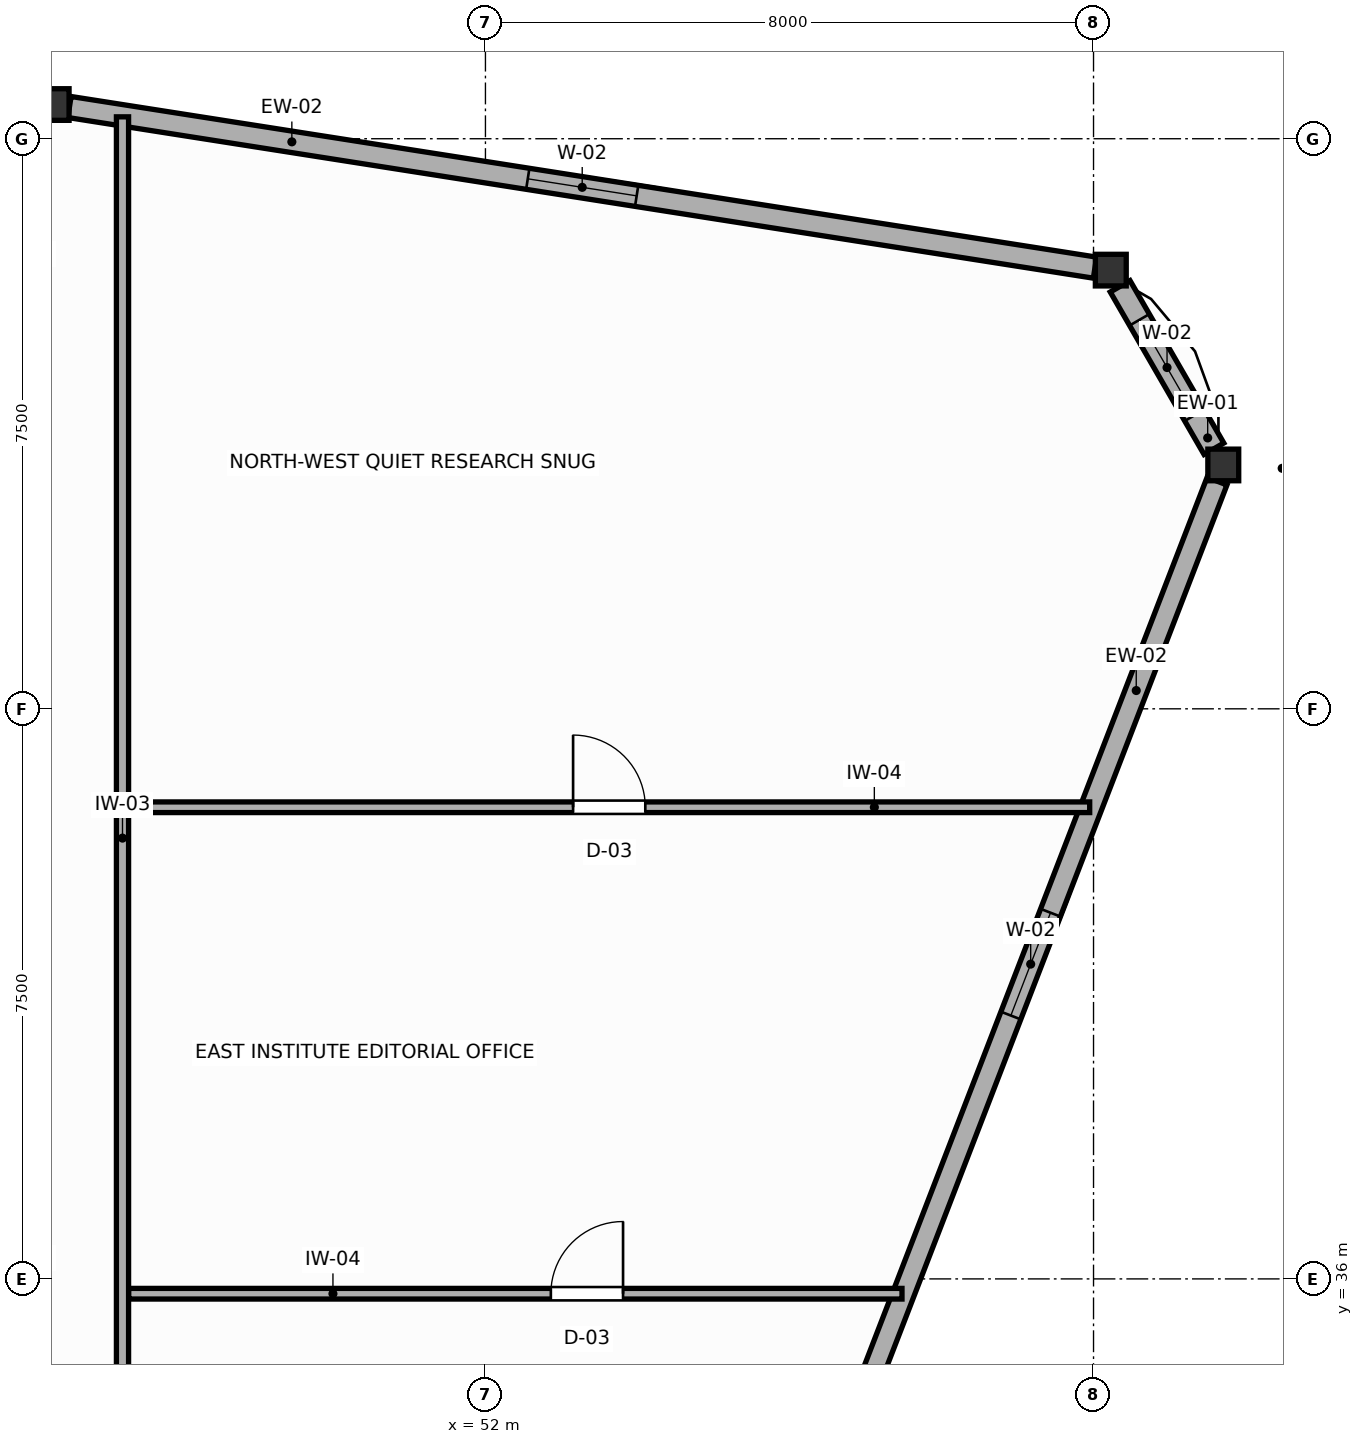
"""IFC4 building model, lengths in metres.
Left out: names, types, materials, properties, quantities, classifications, styles, units other than length and angle.
Written with IfcOpenShell. Run it as: python <this file> out.ifc"""

import sys

from ifc_helpers import new_model, si_unit, direction, frame, frame_2d, origin, origin_2d, place, context, subcontext, project, spatial, rectangle, i_section, extrude, source, transform, mapped, element, fill, save


model = new_model("IFC4")
c1 = context("Model", 3, precision=1e-05, world=origin(), true_north=direction((0.0, 1.0)))
c2 = subcontext(c1, "Body", "Model", "MODEL_VIEW")
j1 = project(units=[si_unit("LENGTHUNIT", "METRE"), si_unit("PLANEANGLEUNIT", "RADIAN")], contexts=[c1])
p1 = place(None, origin())
s1 = spatial("IfcSite", under=j1, at=p1, CompositionType="ELEMENT")
p2 = place(p1, origin())
s2 = spatial("IfcBuilding", under=s1, at=p2, CompositionType="ELEMENT")
p3 = place(p2, frame((0.0, 0.0, 220.2)))
s3 = spatial("IfcBuildingStorey", under=s2, at=p3, CompositionType="ELEMENT", Elevation=220.2)
m1 = source(origin(), c2, "Body", "SweptSolid", [
    extrude(i_section(OverallWidth=0.406, OverallDepth=0.416, WebThickness=0.027, FlangeThickness=0.044, FilletRadius=0.015, at=origin_2d()), origin(), (0.0, 0.0, 1.0), 3.6),
])
for number, where, z_axis, x_axis in (
    (1, (61.707, 46.708, 0.0), (0.0, 0.0, 1.0), (1.0, 0.0, 0.0)),
    (2, (60.227, 49.271, 0.0), (0.0, 0.0, 1.0), (1.0, 0.0, 0.0)),
    (3, (46.319, 51.45, 0.0), (0.0, 0.0, 1.0), (1.0, 0.0, 0.0)),
):
    element("IfcColumn", number, at=place(p3, frame(where, z_axis=z_axis, x_axis=x_axis)), inside=s3, PredefinedType="COLUMN", context=c2, shape_type="MappedRepresentation", body=[
        mapped(m1, transform((0.0, 0.0, 0.0), scale=1.0)),
    ])
p4 = place(p3, frame((61.584, 46.921, 0.0), z_axis=(0.0, 0.0, 1.0), x_axis=(-0.499990780478, 0.866030726613, 0.0)))
e4 = element("IfcWall", 4, at=p4, inside=s3, PredefinedType="SOLIDWALL", context=c2, shape_type="SweptSolid", body=[
    extrude(rectangle(XDim=2.468, YDim=0.3, at=frame_2d((1.234, 0.0))), origin(), (0.0, 0.0, 1.0), 3.02),
])
p5 = place(p4, frame((0.509, 0.0, 0.75)))
e5 = element("IfcOpeningElement", 5, at=p5, cuts=e4, PredefinedType="OPENING", context=c2, shape_type="SweptSolid", body=[
    extrude(rectangle(XDim=1.45, YDim=1.65, at=frame_2d((0.725, 0.825))), frame((0.0, 0.16, 0.0), z_axis=(0.0, -1.0, 0.0), x_axis=(1.0, 0.0, 0.0)), (0.0, 0.0, 1.0), 0.32),
])
p6 = place(p3, frame((60.019, 49.304, 0.0), z_axis=(0.0, 0.0, 1.0), x_axis=(-0.987957437721, 0.154725890697, 0.0)))
e6 = element("IfcWall", 6, at=p6, inside=s3, PredefinedType="SOLIDWALL", context=c2, shape_type="SweptSolid", body=[
    extrude(rectangle(XDim=13.657, YDim=0.28, at=frame_2d((6.828, 0.0))), origin(), (0.0, 0.0, 1.0), 3.02),
])
p7 = place(p6, frame((6.103, 0.0, 0.75)))
e7 = element("IfcOpeningElement", 7, at=p7, cuts=e6, PredefinedType="OPENING", context=c2, shape_type="SweptSolid", body=[
    extrude(rectangle(XDim=1.45, YDim=1.65, at=frame_2d((0.725, 0.825))), frame((0.0, 0.15, 0.0), z_axis=(0.0, -1.0, 0.0), x_axis=(1.0, 0.0, 0.0)), (0.0, 0.0, 1.0), 0.3),
])
p8 = place(p3, frame((56.722, 33.787, 0.0), z_axis=(0.0, 0.0, 1.0), x_axis=(0.359972142588, 0.932963052088, 0.0)))
e8 = element("IfcWall", 8, at=p8, inside=s3, PredefinedType="SOLIDWALL", context=c2, shape_type="SweptSolid", body=[
    extrude(rectangle(XDim=13.621, YDim=0.28, at=frame_2d((6.811, 0.0))), origin(), (0.0, 0.0, 1.0), 3.02),
])
p9 = place(p8, frame((6.086, 0.0, 0.75)))
e9 = element("IfcOpeningElement", 9, at=p9, cuts=e8, PredefinedType="OPENING", context=c2, shape_type="SweptSolid", body=[
    extrude(rectangle(XDim=1.45, YDim=1.65, at=frame_2d((0.725, 0.825))), frame((0.0, 0.15, 0.0), z_axis=(0.0, -1.0, 0.0), x_axis=(1.0, 0.0, 0.0)), (0.0, 0.0, 1.0), 0.3),
])
p10 = place(p3, frame((47.225, 32.31, 0.0), z_axis=(0.0, 0.0, 1.0), x_axis=(0.0, 1.0, 0.0)))
e10 = element("IfcWall", 10, at=p10, inside=s3, PredefinedType="PARTITIONING", context=c2, shape_type="SweptSolid", body=[
    extrude(rectangle(XDim=18.978, YDim=0.16, at=frame_2d((9.489, 0.0))), origin(), (0.0, 0.0, 1.0), 3.41),
])
p11 = place(p3, frame((47.307, 42.205, 0.0), z_axis=(0.0, 0.0, 1.0), x_axis=(1.0, 0.0, 0.0)))
e11 = element("IfcWall", 11, at=p11, inside=s3, PredefinedType="PARTITIONING", context=c2, shape_type="SweptSolid", body=[
    extrude(rectangle(XDim=12.643, YDim=0.14, at=frame_2d((6.321, 0.0))), origin(), (0.0, 0.0, 1.0), 3.41),
])
p12 = place(p11, frame((5.846, 0.0, 0.0)))
e12 = element("IfcOpeningElement", 12, at=p12, cuts=e11, PredefinedType="OPENING", context=c2, shape_type="SweptSolid", body=[
    extrude(rectangle(XDim=0.95, YDim=2.05, at=frame_2d((0.475, 1.025))), frame((0.0, 0.08, 0.0), z_axis=(0.0, -1.0, 0.0), x_axis=(1.0, 0.0, 0.0)), (0.0, 0.0, 1.0), 0.16),
])
p13 = place(p3, frame((47.307, 35.805, 0.0), z_axis=(0.0, 0.0, 1.0), x_axis=(1.0, 0.0, 0.0)))
e13 = element("IfcWall", 13, at=p13, inside=s3, PredefinedType="PARTITIONING", context=c2, shape_type="SweptSolid", body=[
    extrude(rectangle(XDim=10.173, YDim=0.14, at=frame_2d((5.087, 0.0))), origin(), (0.0, 0.0, 1.0), 3.41),
])
p14 = place(p13, frame((5.553, 0.0, 0.0)))
e14 = element("IfcOpeningElement", 14, at=p14, cuts=e13, PredefinedType="OPENING", context=c2, shape_type="SweptSolid", body=[
    extrude(rectangle(XDim=0.95, YDim=2.05, at=frame_2d((0.475, 1.025))), frame((0.0, 0.08, 0.0), z_axis=(0.0, -1.0, 0.0), x_axis=(1.0, 0.0, 0.0)), (0.0, 0.0, 1.0), 0.16),
])
p15 = place(p5, origin())
e15 = element("IfcWindow", 15, at=p15, inside=s3, PartitioningType="SINGLE_PANEL", PredefinedType="WINDOW", context=c2, shape_type="SweptSolid", body=[
    extrude(rectangle(XDim=1.45, YDim=1.65, at=frame_2d((0.725, 0.825))), frame((0.0, 0.03, 0.0), z_axis=(0.0, -1.0, 0.0), x_axis=(1.0, 0.0, 0.0)), (0.0, 0.0, 1.0), 0.06),
])
fill(e5, e15)
p16 = place(p7, origin())
e16 = element("IfcWindow", 16, at=p16, inside=s3, PartitioningType="SINGLE_PANEL", PredefinedType="WINDOW", context=c2, shape_type="SweptSolid", body=[
    extrude(rectangle(XDim=1.45, YDim=1.65, at=frame_2d((0.725, 0.825))), frame((0.0, 0.03, 0.0), z_axis=(0.0, -1.0, 0.0), x_axis=(1.0, 0.0, 0.0)), (0.0, 0.0, 1.0), 0.06),
])
fill(e7, e16)
p17 = place(p9, origin())
e17 = element("IfcWindow", 17, at=p17, inside=s3, PartitioningType="SINGLE_PANEL", PredefinedType="WINDOW", context=c2, shape_type="SweptSolid", body=[
    extrude(rectangle(XDim=1.45, YDim=1.65, at=frame_2d((0.725, 0.825))), frame((0.0, 0.03, 0.0), z_axis=(0.0, -1.0, 0.0), x_axis=(1.0, 0.0, 0.0)), (0.0, 0.0, 1.0), 0.06),
])
fill(e9, e17)
p18 = place(p12, origin())
e18 = element("IfcDoor", 18, at=p18, inside=s3, OperationType="SINGLE_SWING_LEFT", PredefinedType="DOOR", context=c2, shape_type="SweptSolid", body=[
    extrude(rectangle(XDim=0.95, YDim=2.05, at=frame_2d((0.475, 1.025))), frame((0.0, 0.025, 0.0), z_axis=(0.0, -1.0, 0.0), x_axis=(1.0, 0.0, 0.0)), (0.0, 0.0, 1.0), 0.05),
])
fill(e12, e18)
p19 = place(p14, origin())
e19 = element("IfcDoor", 19, at=p19, inside=s3, OperationType="SINGLE_SWING_RIGHT", PredefinedType="DOOR", context=c2, shape_type="SweptSolid", body=[
    extrude(rectangle(XDim=0.95, YDim=2.05, at=frame_2d((0.475, 1.025))), frame((0.0, 0.025, 0.0), z_axis=(0.0, -1.0, 0.0), x_axis=(1.0, 0.0, 0.0)), (0.0, 0.0, 1.0), 0.05),
])
fill(e14, e19)
save(model, sys.argv[1])
